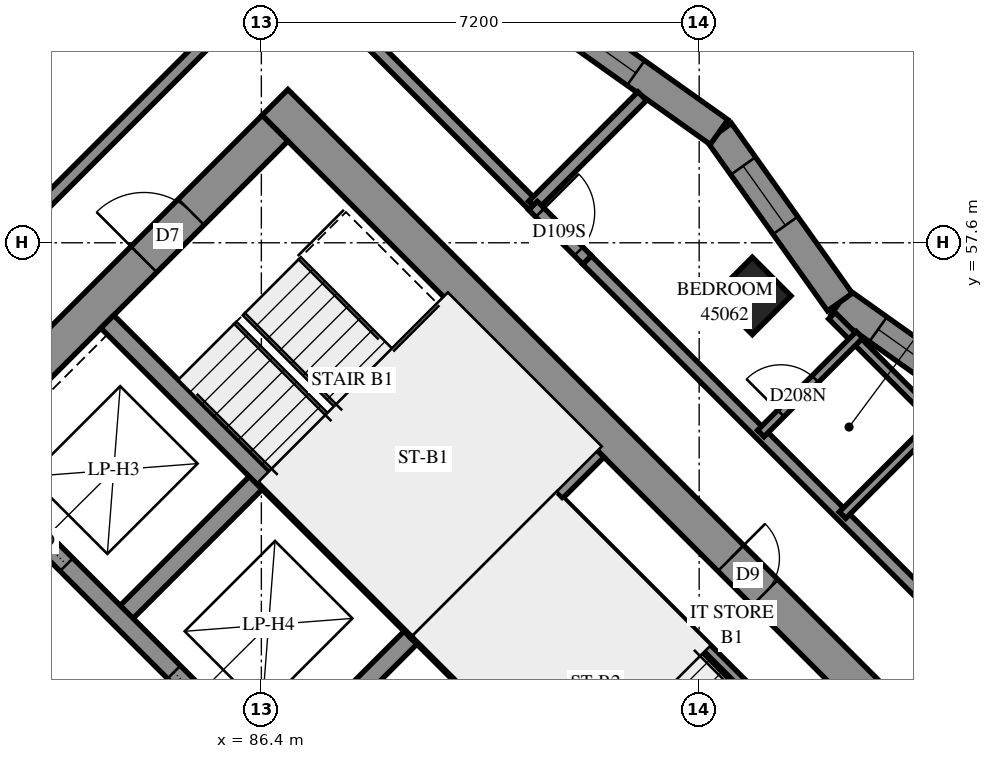
"""IFC4 building model, lengths in metres.
Left out: names, types, materials, properties, quantities, classifications, styles, units other than length and angle.
Written with IfcOpenShell. Run it as: python <this file> out.ifc"""

import sys

from ifc_helpers import new_model, si_unit, direction, frame, frame_2d, origin, origin_2d, place, context, subcontext, project, spatial, polyline, rectangle, outline, extrude, element, fill, save


model = new_model("IFC4")
c1 = context("Model", 3, precision=1e-05, world=origin(), true_north=direction((0.0, 1.0)))
c2 = subcontext(c1, "Body", "Model", "MODEL_VIEW")
j1 = project(units=[si_unit("LENGTHUNIT", "METRE"), si_unit("PLANEANGLEUNIT", "RADIAN")], contexts=[c1])
p1 = place(None, origin())
s1 = spatial("IfcSite", under=j1, at=p1, CompositionType="ELEMENT")
p2 = place(p1, origin())
s2 = spatial("IfcBuilding", under=s1, at=p2, CompositionType="ELEMENT")
p3 = place(p2, frame((0.0, 0.0, 166.0)))
s3 = spatial("IfcBuildingStorey", under=s2, at=p3, CompositionType="ELEMENT", Elevation=166.0)
p4 = place(p3, frame((94.474, 56.727, 0.0), z_axis=(0.0, 0.0, 1.0), x_axis=(0.7071067812, -0.7071067812, 0.0)))
e1 = element("IfcColumn", 1, at=p4, inside=s3, PredefinedType="COLUMN", context=c2, shape_type="SweptSolid", body=[
    extrude(rectangle(XDim=0.9, YDim=0.9, at=origin_2d()), origin(), (0.0, 0.0, 1.0), 3.1),
])
p5 = place(p3, frame((86.625, 59.908, -0.3), z_axis=(0.0, 0.0, 1.0), x_axis=(0.7071067812, -0.7071067812, 0.0)))
e2 = element("IfcWall", 2, at=p5, inside=s3, PredefinedType="SHEAR", context=c2, shape_type="SweptSolid", body=[
    extrude(rectangle(XDim=15.6, YDim=0.6, at=frame_2d((7.8, 0.0))), origin(), (0.0, 0.0, 1.0), 2.7),
])
p6 = place(p5, frame((10.6, 0.0, 0.3)))
e3 = element("IfcOpeningElement", 3, at=p6, cuts=e2, PredefinedType="OPENING", context=c2, shape_type="SweptSolid", body=[
    extrude(rectangle(XDim=0.8, YDim=2.1, at=frame_2d((0.4, 1.05))), frame((0.0, 0.31, 0.0), z_axis=(0.0, -1.0, 0.0), x_axis=(1.0, 0.0, 0.0)), (0.0, 0.0, 1.0), 0.62),
])
p7 = place(p3, frame((76.442, 49.302, -0.3), z_axis=(0.0, 0.0, 1.0), x_axis=(0.7071067812, 0.7071067812, 0.0)))
e4 = element("IfcWall", 4, at=p7, inside=s3, PredefinedType="SHEAR", context=c2, shape_type="SweptSolid", body=[
    extrude(rectangle(XDim=14.4, YDim=0.6, at=frame_2d((7.2, 0.0))), origin(), (0.0, 0.0, 1.0), 2.7),
])
p8 = place(p7, frame((4.55, 0.0, 0.3)))
e5 = element("IfcOpeningElement", 5, at=p8, cuts=e4, PredefinedType="OPENING", context=c2, shape_type="SweptSolid", body=[
    extrude(rectangle(XDim=1.1, YDim=2.1, at=frame_2d((0.55, 1.05))), frame((0.0, 0.31, 0.0), z_axis=(0.0, -1.0, 0.0), x_axis=(1.0, 0.0, 0.0)), (0.0, 0.0, 1.0), 0.62),
])
p9 = place(p7, frame((11.35, 0.0, 0.3)))
e6 = element("IfcOpeningElement", 6, at=p9, cuts=e4, PredefinedType="OPENING", context=c2, shape_type="SweptSolid", body=[
    extrude(rectangle(XDim=1.1, YDim=2.1, at=frame_2d((0.55, 1.05))), frame((0.0, 0.31, 0.0), z_axis=(0.0, -1.0, 0.0), x_axis=(1.0, 0.0, 0.0)), (0.0, 0.0, 1.0), 0.62),
])
p10 = place(p3, frame((84.079, 51.423, 0.0), z_axis=(0.0, 0.0, 1.0), x_axis=(0.7071219326, 0.7070916295, 0.0)))
e7 = element("IfcWall", 7, at=p10, inside=s3, PredefinedType="SOLIDWALL", context=c2, shape_type="SweptSolid", body=[
    extrude(rectangle(XDim=3.3, YDim=0.3, at=frame_2d((1.65, 0.0))), origin(), (0.0, 0.0, 1.0), 3.1),
])
p11 = place(p3, frame((86.625, 48.878, 0.0), z_axis=(0.0, 0.0, 1.0), x_axis=(0.7071067812, 0.7071067812, 0.0)))
e8 = element("IfcWall", 8, at=p11, inside=s3, PredefinedType="SOLIDWALL", context=c2, shape_type="SweptSolid", body=[
    extrude(rectangle(XDim=3.3, YDim=0.3, at=frame_2d((1.65, 0.0))), origin(), (0.0, 0.0, 1.0), 3.1),
])
p12 = place(p3, frame((78.988, 51.423, 0.0), z_axis=(0.0, 0.0, 1.0), x_axis=(0.7071067812, -0.7071067812, 0.0)))
e9 = element("IfcWall", 9, at=p12, inside=s3, PredefinedType="SOLIDWALL", context=c2, shape_type="SweptSolid", body=[
    extrude(rectangle(XDim=14.4, YDim=0.3, at=frame_2d((7.2, 0.0))), origin(), (0.0, 0.0, 1.0), 3.1),
])
p13 = place(p12, frame((1.35, 0.0, 0.0)))
e10 = element("IfcOpeningElement", 10, at=p13, cuts=e9, PredefinedType="OPENING", context=c2, shape_type="SweptSolid", body=[
    extrude(rectangle(XDim=0.9, YDim=2.1, at=frame_2d((0.45, 1.05))), frame((0.0, 0.16, 0.0), z_axis=(0.0, -1.0, 0.0), x_axis=(1.0, 0.0, 0.0)), (0.0, 0.0, 1.0), 0.32),
])
p14 = place(p12, frame((4.95, 0.0, 0.0)))
e11 = element("IfcOpeningElement", 11, at=p14, cuts=e9, PredefinedType="OPENING", context=c2, shape_type="SweptSolid", body=[
    extrude(rectangle(XDim=0.9, YDim=2.1, at=frame_2d((0.45, 1.05))), frame((0.0, 0.16, 0.0), z_axis=(0.0, -1.0, 0.0), x_axis=(1.0, 0.0, 0.0)), (0.0, 0.0, 1.0), 0.32),
])
p15 = place(p12, frame((8.55, 0.0, 0.0)))
e12 = element("IfcOpeningElement", 12, at=p15, cuts=e9, PredefinedType="OPENING", context=c2, shape_type="SweptSolid", body=[
    extrude(rectangle(XDim=0.9, YDim=2.1, at=frame_2d((0.45, 1.05))), frame((0.0, 0.16, 0.0), z_axis=(0.0, -1.0, 0.0), x_axis=(1.0, 0.0, 0.0)), (0.0, 0.0, 1.0), 0.32),
])
p16 = place(p12, frame((12.05, 0.0, 0.0)))
e13 = element("IfcOpeningElement", 13, at=p16, cuts=e9, PredefinedType="OPENING", context=c2, shape_type="SweptSolid", body=[
    extrude(rectangle(XDim=1.1, YDim=2.1, at=frame_2d((0.55, 1.05))), frame((0.0, 0.16, 0.0), z_axis=(0.0, -1.0, 0.0), x_axis=(1.0, 0.0, 0.0)), (0.0, 0.0, 1.0), 0.32),
])
p17 = place(p3, frame((81.534, 53.969, 0.0), z_axis=(0.0, 0.0, 1.0), x_axis=(0.707103309, -0.7071102534, 0.0)))
e14 = element("IfcWall", 14, at=p17, inside=s3, PredefinedType="SOLIDWALL", context=c2, shape_type="SweptSolid", body=[
    extrude(rectangle(XDim=14.4, YDim=0.3, at=frame_2d((7.2, 0.0))), origin(), (0.0, 0.0, 1.0), 3.1),
])
p18 = place(p17, frame((1.25, 0.0, 0.0)))
e15 = element("IfcOpeningElement", 15, at=p18, cuts=e14, PredefinedType="OPENING", context=c2, shape_type="SweptSolid", body=[
    extrude(rectangle(XDim=1.1, YDim=2.1, at=frame_2d((0.55, 1.05))), frame((0.0, 0.16, 0.0), z_axis=(0.0, -1.0, 0.0), x_axis=(1.0, 0.0, 0.0)), (0.0, 0.0, 1.0), 0.32),
])
p19 = place(p17, frame((4.85, 0.0, 0.0)))
e16 = element("IfcOpeningElement", 16, at=p19, cuts=e14, PredefinedType="OPENING", context=c2, shape_type="SweptSolid", body=[
    extrude(rectangle(XDim=1.1, YDim=2.1, at=frame_2d((0.55, 1.05))), frame((0.0, 0.16, 0.0), z_axis=(0.0, -1.0, 0.0), x_axis=(1.0, 0.0, 0.0)), (0.0, 0.0, 1.0), 0.32),
])
p20 = place(p17, frame((8.45, 0.0, 0.0)))
e17 = element("IfcOpeningElement", 17, at=p20, cuts=e14, PredefinedType="OPENING", context=c2, shape_type="SweptSolid", body=[
    extrude(rectangle(XDim=1.1, YDim=2.1, at=frame_2d((0.55, 1.05))), frame((0.0, 0.16, 0.0), z_axis=(0.0, -1.0, 0.0), x_axis=(1.0, 0.0, 0.0)), (0.0, 0.0, 1.0), 0.32),
])
p21 = place(p17, frame((12.05, 0.0, 0.0)))
e18 = element("IfcOpeningElement", 18, at=p21, cuts=e14, PredefinedType="OPENING", context=c2, shape_type="SweptSolid", body=[
    extrude(rectangle(XDim=1.1, YDim=2.1, at=frame_2d((0.55, 1.05))), frame((0.0, 0.16, 0.0), z_axis=(0.0, -1.0, 0.0), x_axis=(1.0, 0.0, 0.0)), (0.0, 0.0, 1.0), 0.32),
])
for number, where, z_axis, x_axis in (
    (19, (83.867, 56.302, 0.0), (0.0, 0.0, 1.0), (0.707, -0.707, 0.0)),
    (20, (88.958, 51.211, 0.0), (0.0, 0.0, 1.0), (0.707, -0.707, 0.0)),
):
    element("IfcWall", number, at=place(p3, frame(where, z_axis=z_axis, x_axis=x_axis)), inside=s3, PredefinedType="SOLIDWALL", context=c2, shape_type="SweptSolid", body=[
        extrude(rectangle(XDim=7.2, YDim=0.3, at=frame_2d((3.6, 0.0))), origin(), (0.0, 0.0, 1.0), 3.1),
    ])
p22 = place(p3, frame((88.958, 51.211, 0.0), z_axis=(0.0, 0.0, 1.0), x_axis=(0.7071067812, 0.7071067812, 0.0)))
e21 = element("IfcWall", 21, at=p22, inside=s3, PredefinedType="SOLIDWALL", context=c2, shape_type="SweptSolid", body=[
    extrude(rectangle(XDim=4.2, YDim=0.3, at=frame_2d((2.1, 0.0))), origin(), (0.0, 0.0, 1.0), 3.1),
])
p23 = place(p3, frame((98.71, 54.638, 0.0), z_axis=(0.0, 0.0, 1.0), x_axis=(-0.8151376585, 0.5792672938, 0.0)))
e22 = element("IfcWall", 22, at=p23, inside=s3, PredefinedType="SOLIDWALL", context=c2, shape_type="SweptSolid", body=[
    extrude(outline(polyline([(-0.042, -0.25), (3.388, -0.25), (3.472, 0.25), (0.042, 0.25), (-0.042, -0.25)])), origin(), (0.0, 0.0, 1.0), 3.1),
])
p24 = place(p23, frame((1.457, 0.0, 0.45)))
e23 = element("IfcOpeningElement", 23, at=p24, cuts=e22, PredefinedType="OPENING", context=c2, shape_type="SweptSolid", body=[
    extrude(rectangle(XDim=1.2, YDim=2.5, at=frame_2d((0.6, 1.25))), frame((0.0, 0.26, 0.0), z_axis=(0.0, -1.0, 0.0), x_axis=(1.0, 0.0, 0.0)), (0.0, 0.0, 1.0), 0.52),
])
p25 = place(p3, frame((95.914, 56.624, 0.0), z_axis=(0.0, 0.0, 1.0), x_axis=(-0.5792728992, 0.8151336751, 0.0)))
e24 = element("IfcWall", 24, at=p25, inside=s3, PredefinedType="SOLIDWALL", context=c2, shape_type="SweptSolid", body=[
    extrude(outline(polyline([(0.042, -0.25), (3.472, -0.25), (3.388, 0.25), (-0.042, 0.25), (0.042, -0.25)])), origin(), (0.0, 0.0, 1.0), 3.1),
])
p26 = place(p25, frame((1.547, 0.0, 0.45)))
e25 = element("IfcOpeningElement", 25, at=p26, cuts=e24, PredefinedType="OPENING", context=c2, shape_type="SweptSolid", body=[
    extrude(rectangle(XDim=1.2, YDim=2.5, at=frame_2d((0.6, 1.25))), frame((0.0, 0.26, 0.0), z_axis=(0.0, -1.0, 0.0), x_axis=(1.0, 0.0, 0.0)), (0.0, 0.0, 1.0), 0.52),
])
p27 = place(p3, frame((93.927, 59.42, 0.0), z_axis=(0.0, 0.0, 1.0), x_axis=(-0.8151376585, 0.5792672938, 0.0)))
e26 = element("IfcWall", 26, at=p27, inside=s3, PredefinedType="SOLIDWALL", context=c2, shape_type="SweptSolid", body=[
    extrude(outline(polyline([(-0.042, -0.25), (3.388, -0.25), (3.472, 0.25), (0.042, 0.25), (-0.042, -0.25)])), origin(), (0.0, 0.0, 1.0), 3.1),
])
p28 = place(p27, frame((1.679, 0.0, 0.45)))
e27 = element("IfcOpeningElement", 27, at=p28, cuts=e26, PredefinedType="OPENING", context=c2, shape_type="SweptSolid", body=[
    extrude(rectangle(XDim=1.2, YDim=2.5, at=frame_2d((0.6, 1.25))), frame((0.0, 0.26, 0.0), z_axis=(0.0, -1.0, 0.0), x_axis=(1.0, 0.0, 0.0)), (0.0, 0.0, 1.0), 0.52),
])
p29 = place(p3, frame((91.313, 53.354, 0.0), z_axis=(0.0, 0.0, 1.0), x_axis=(0.7071140275, -0.7070995348, 0.0)))
e28 = element("IfcWall", 28, at=p29, inside=s3, PredefinedType="PARTITIONING", context=c2, shape_type="SweptSolid", body=[
    extrude(rectangle(XDim=6.9, YDim=0.15, at=frame_2d((3.45, 0.0))), origin(), (0.0, 0.0, 1.0), 3.1),
])
p30 = place(p3, frame((91.755, 57.317, 0.0), z_axis=(0.0, 0.0, 1.0), x_axis=(0.7071067812, -0.7071067812, 0.0)))
e29 = element("IfcWall", 29, at=p30, inside=s3, PredefinedType="PARTITIONING", context=c2, shape_type="SweptSolid", body=[
    extrude(rectangle(XDim=11.639, YDim=0.2, at=frame_2d((5.819, 0.0))), origin(), (0.0, 0.0, 1.0), 3.1),
])
p31 = place(p3, frame((80.154, 55.56, 0.0), z_axis=(0.0, 0.0, 1.0), x_axis=(0.7071067812, 0.7071067812, 0.0)))
e30 = element("IfcWall", 30, at=p31, inside=s3, PredefinedType="PARTITIONING", context=c2, shape_type="SweptSolid", body=[
    extrude(rectangle(XDim=9.45, YDim=0.2, at=frame_2d((4.725, 0.0))), origin(), (0.0, 0.0, 1.0), 3.1),
])
p32 = place(p31, frame((0.292, 0.0, 0.0)))
e31 = element("IfcOpeningElement", 31, at=p32, cuts=e30, PredefinedType="OPENING", context=c2, shape_type="SweptSolid", body=[
    extrude(rectangle(XDim=1.0, YDim=2.1, at=frame_2d((0.5, 1.05))), frame((0.0, 0.11, 0.0), z_axis=(0.0, -1.0, 0.0), x_axis=(1.0, 0.0, 0.0)), (0.0, 0.0, 1.0), 0.22),
])
p33 = place(p3, frame((86.841, 62.245, 0.0), z_axis=(0.0, 0.0, 1.0), x_axis=(0.7071067812, -0.7071067812, 0.0)))
e32 = element("IfcWall", 32, at=p33, inside=s3, PredefinedType="PARTITIONING", context=c2, shape_type="SweptSolid", body=[
    extrude(rectangle(XDim=5.699, YDim=0.2, at=frame_2d((2.85, 0.0))), origin(), (0.0, 0.0, 1.0), 3.1),
])
p34 = place(p3, frame((95.957, 53.121, 0.0), z_axis=(0.0, 0.0, 1.0), x_axis=(0.7070876797, 0.7071258821, 0.0)))
e33 = element("IfcWall", 33, at=p34, inside=s3, PredefinedType="PARTITIONING", context=c2, shape_type="SweptSolid", body=[
    extrude(rectangle(XDim=2.618, YDim=0.15, at=frame_2d((1.309, 0.0))), origin(), (0.0, 0.0, 1.0), 3.1),
])
p35 = place(p3, frame((90.867, 58.213, 0.0), z_axis=(0.0, 0.0, 1.0), x_axis=(0.7066148947, 0.7075983258, 0.0)))
e34 = element("IfcWall", 34, at=p35, inside=s3, PredefinedType="PARTITIONING", context=c2, shape_type="SweptSolid", body=[
    extrude(rectangle(XDim=2.542, YDim=0.2, at=frame_2d((1.271, 0.0))), origin(), (0.0, 0.0, 1.0), 3.1),
])
p36 = place(p3, frame((95.782, 56.401, 0.0), z_axis=(0.0, 0.0, 1.0), x_axis=(0.707127237, -0.7070863248, 0.0)))
e35 = element("IfcWall", 35, at=p36, inside=s3, PredefinedType="PARTITIONING", context=c2, shape_type="SweptSolid", body=[
    extrude(rectangle(XDim=2.444, YDim=0.15, at=frame_2d((1.222, 0.0))), origin(), (0.0, 0.0, 1.0), 3.1),
])
p37 = place(p3, frame((94.614, 54.464, 0.0), z_axis=(0.0, 0.0, 1.0), x_axis=(0.7071067812, 0.7071067812, 0.0)))
e36 = element("IfcWall", 36, at=p37, inside=s3, PredefinedType="PARTITIONING", context=c2, shape_type="SweptSolid", body=[
    extrude(rectangle(XDim=2.296, YDim=0.15, at=frame_2d((1.148, 0.0))), origin(), (0.0, 0.0, 1.0), 3.1),
])
p38 = place(p37, frame((0.466, 0.0, 0.0)))
e37 = element("IfcOpeningElement", 37, at=p38, cuts=e36, PredefinedType="OPENING", context=c2, shape_type="SweptSolid", body=[
    extrude(rectangle(XDim=0.8, YDim=2.1, at=frame_2d((0.4, 1.05))), frame((0.0, 0.085, 0.0), z_axis=(0.0, -1.0, 0.0), x_axis=(1.0, 0.0, 0.0)), (0.0, 0.0, 1.0), 0.17),
])
p39 = place(p3, frame((90.867, 58.211, 0.0), z_axis=(0.0, 0.0, 1.0), x_axis=(0.706312726, -0.7078999456, 0.0)))
e38 = element("IfcWall", 38, at=p39, inside=s3, PredefinedType="PARTITIONING", context=c2, shape_type="SweptSolid", body=[
    extrude(rectangle(XDim=1.26, YDim=0.2, at=frame_2d((0.63, 0.0))), origin(), (0.0, 0.0, 1.0), 3.1),
])
p40 = place(p39, frame((0.162, 0.0, 0.0)))
e39 = element("IfcOpeningElement", 39, at=p40, cuts=e38, PredefinedType="OPENING", context=c2, shape_type="SweptSolid", body=[
    extrude(rectangle(XDim=0.9, YDim=2.1, at=frame_2d((0.45, 1.05))), frame((0.0, 0.11, 0.0), z_axis=(0.0, -1.0, 0.0), x_axis=(1.0, 0.0, 0.0)), (0.0, 0.0, 1.0), 0.22),
])
p41 = place(p24, origin())
e40 = element("IfcWindow", 40, at=p41, inside=s3, PartitioningType="SINGLE_PANEL", PredefinedType="WINDOW", context=c2, shape_type="SweptSolid", body=[
    extrude(rectangle(XDim=1.2, YDim=2.5, at=frame_2d((0.6, 1.25))), frame((0.0, 0.18, 0.0), z_axis=(0.0, -1.0, 0.0), x_axis=(1.0, 0.0, 0.0)), (0.0, 0.0, 1.0), 0.06),
])
fill(e23, e40)
p42 = place(p26, origin())
e41 = element("IfcWindow", 41, at=p42, inside=s3, PartitioningType="SINGLE_PANEL", PredefinedType="WINDOW", context=c2, shape_type="SweptSolid", body=[
    extrude(rectangle(XDim=1.2, YDim=2.5, at=frame_2d((0.6, 1.25))), frame((0.0, 0.18, 0.0), z_axis=(0.0, -1.0, 0.0), x_axis=(1.0, 0.0, 0.0)), (0.0, 0.0, 1.0), 0.06),
])
fill(e25, e41)
p43 = place(p28, origin())
e42 = element("IfcWindow", 42, at=p43, inside=s3, PartitioningType="SINGLE_PANEL", PredefinedType="WINDOW", context=c2, shape_type="SweptSolid", body=[
    extrude(rectangle(XDim=1.2, YDim=2.5, at=frame_2d((0.6, 1.25))), frame((0.0, 0.18, 0.0), z_axis=(0.0, -1.0, 0.0), x_axis=(1.0, 0.0, 0.0)), (0.0, 0.0, 1.0), 0.06),
])
fill(e27, e42)
p44 = place(p6, origin())
e43 = element("IfcDoor", 43, at=p44, inside=s3, OperationType="SINGLE_SWING_RIGHT", PredefinedType="DOOR", context=c2, shape_type="SweptSolid", body=[
    extrude(rectangle(XDim=0.8, YDim=2.1, at=frame_2d((0.4, 1.05))), frame((0.0, 0.025, 0.0), z_axis=(0.0, -1.0, 0.0), x_axis=(1.0, 0.0, 0.0)), (0.0, 0.0, 1.0), 0.05),
])
fill(e3, e43)
p45 = place(p9, origin())
e44 = element("IfcDoor", 44, at=p45, inside=s3, OperationType="SINGLE_SWING_LEFT", PredefinedType="DOOR", context=c2, shape_type="SweptSolid", body=[
    extrude(rectangle(XDim=1.1, YDim=2.1, at=frame_2d((0.55, 1.05))), frame((0.0, 0.025, 0.0), z_axis=(0.0, -1.0, 0.0), x_axis=(1.0, 0.0, 0.0)), (0.0, 0.0, 1.0), 0.05),
])
fill(e6, e44)
p46 = place(p18, origin())
e45 = element("IfcDoor", 45, at=p46, inside=s3, OperationType="SLIDING_TO_LEFT", PredefinedType="DOOR", context=c2, shape_type="SweptSolid", body=[
    extrude(rectangle(XDim=1.1, YDim=2.1, at=frame_2d((0.55, 1.05))), frame((0.0, 0.025, 0.0), z_axis=(0.0, -1.0, 0.0), x_axis=(1.0, 0.0, 0.0)), (0.0, 0.0, 1.0), 0.05),
])
fill(e15, e45)
p47 = place(p19, origin())
e46 = element("IfcDoor", 46, at=p47, inside=s3, OperationType="SLIDING_TO_RIGHT", PredefinedType="DOOR", context=c2, shape_type="SweptSolid", body=[
    extrude(rectangle(XDim=1.1, YDim=2.1, at=frame_2d((0.55, 1.05))), frame((0.0, 0.025, 0.0), z_axis=(0.0, -1.0, 0.0), x_axis=(1.0, 0.0, 0.0)), (0.0, 0.0, 1.0), 0.05),
])
fill(e16, e46)
p48 = place(p40, origin())
e47 = element("IfcDoor", 47, at=p48, inside=s3, OperationType="SINGLE_SWING_RIGHT", PredefinedType="DOOR", context=c2, shape_type="SweptSolid", body=[
    extrude(rectangle(XDim=0.9, YDim=2.1, at=frame_2d((0.45, 1.05))), frame((0.0, 0.025, 0.0), z_axis=(0.0, -1.0, 0.0), x_axis=(1.0, 0.0, 0.0)), (0.0, 0.0, 1.0), 0.05),
])
fill(e39, e47)
p49 = place(p38, origin())
e48 = element("IfcDoor", 48, at=p49, inside=s3, OperationType="SINGLE_SWING_RIGHT", PredefinedType="DOOR", context=c2, shape_type="SweptSolid", body=[
    extrude(rectangle(XDim=0.8, YDim=2.1, at=frame_2d((0.4, 1.05))), frame((0.0, 0.025, 0.0), z_axis=(0.0, -1.0, 0.0), x_axis=(1.0, 0.0, 0.0)), (0.0, 0.0, 1.0), 0.05),
])
fill(e37, e48)
save(model, sys.argv[1])
